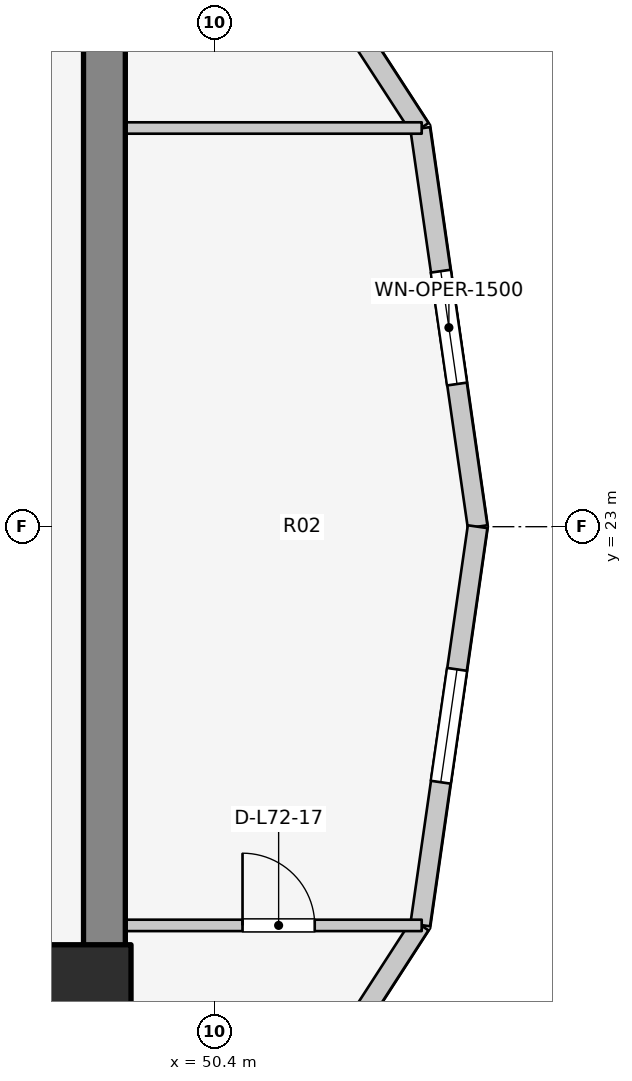
"""IFC4 building model, lengths in metres.
Left out: names, types, materials, properties, quantities, classifications, styles, units other than length and angle.
Written with IfcOpenShell. Run it as: python <this file> out.ifc"""

import sys

from ifc_helpers import new_model, si_unit, direction, frame, frame_2d, origin, origin_2d, place, context, subcontext, project, spatial, rectangle, extrude, element, fill, save


model = new_model("IFC4")
c1 = context("Model", 3, precision=1e-05, world=origin(), true_north=direction((0.0, 1.0)))
c2 = subcontext(c1, "Body", "Model", "MODEL_VIEW")
j1 = project(units=[si_unit("LENGTHUNIT", "METRE"), si_unit("PLANEANGLEUNIT", "RADIAN")], contexts=[c1])
p1 = place(None, origin())
s1 = spatial("IfcSite", under=j1, at=p1, CompositionType="ELEMENT")
p2 = place(p1, origin())
s2 = spatial("IfcBuilding", under=s1, at=p2, CompositionType="ELEMENT")
p3 = place(p2, frame((0.0, 0.0, 235.7)))
s3 = spatial("IfcBuildingStorey", under=s2, at=p3, CompositionType="ELEMENT", Elevation=235.7)
p4 = place(p3, frame((48.95, 17.05, 0.0), z_axis=(0.0, 0.0, 1.0), x_axis=(0.0, 1.0, 0.0)))
e1 = element("IfcWall", 1, at=p4, inside=s3, PredefinedType="SHEAR", context=c2, shape_type="SweptSolid", body=[
    extrude(rectangle(XDim=12.8, YDim=0.55, at=frame_2d((6.4, 0.0))), origin(), (0.0, 0.0, 1.0), 3.1),
])
p5 = place(p3, frame((48.7, 16.9, 0.0), z_axis=(0.0, 0.0, 1.0), x_axis=(1.0, 0.0, 0.0)))
e2 = element("IfcColumn", 2, at=p5, inside=s3, PredefinedType="COLUMN", context=c2, shape_type="SweptSolid", body=[
    extrude(rectangle(XDim=1.2, YDim=1.2, at=origin_2d()), origin(), (0.0, 0.0, 1.0), 3.1),
])
p6 = place(p3, frame((53.86, 23.0, 0.0), z_axis=(0.0, 0.0, 1.0), x_axis=(-0.142712754019, 0.989764148593, 0.0)))
e3 = element("IfcWall", 3, at=p6, inside=s3, PredefinedType="STANDARD", context=c2, shape_type="SweptSolid", body=[
    extrude(rectangle(XDim=5.293, YDim=0.26, at=frame_2d((2.646, 0.0))), origin(), (0.0, 0.0, 1.0), 2.57),
])
p7 = place(p6, frame((1.896, 0.0, 0.75)))
e4 = element("IfcOpeningElement", 4, at=p7, cuts=e3, PredefinedType="OPENING", context=c2, shape_type="SweptSolid", body=[
    extrude(rectangle(XDim=1.5, YDim=1.6, at=frame_2d((0.75, 0.8))), frame((0.0, 0.14, 0.0), z_axis=(0.0, -1.0, 0.0), x_axis=(1.0, 0.0, 0.0)), (0.0, 0.0, 1.0), 0.28),
])
p8 = place(p3, frame((53.105, 28.239, 0.0), z_axis=(0.0, 0.0, 1.0), x_axis=(-0.544475908819, 0.838776480784, 0.0)))
e5 = element("IfcWall", 5, at=p8, inside=s3, PredefinedType="STANDARD", context=c2, shape_type="SweptSolid", body=[
    extrude(rectangle(XDim=4.305, YDim=0.26, at=frame_2d((2.152, 0.0))), origin(), (0.0, 0.0, 1.0), 1.22),
])
p9 = place(p8, frame((1.552, 0.0, 0.15)))
e6 = element("IfcOpeningElement", 6, at=p9, cuts=e5, PredefinedType="OPENING", context=c2, shape_type="SweptSolid", body=[
    extrude(rectangle(XDim=1.2, YDim=0.9, at=frame_2d((0.6, 0.45))), frame((0.0, 0.14, 0.0), z_axis=(0.0, -1.0, 0.0), x_axis=(1.0, 0.0, 0.0)), (0.0, 0.0, 1.0), 0.28),
])
p10 = place(p3, frame((50.761, 14.133, 0.0), z_axis=(0.0, 0.0, 1.0), x_axis=(0.542641766008, 0.839964233634, 0.0)))
e7 = element("IfcWall", 7, at=p10, inside=s3, PredefinedType="STANDARD", context=c2, shape_type="SweptSolid", body=[
    extrude(rectangle(XDim=4.319, YDim=0.26, at=frame_2d((2.16, 0.0))), origin(), (0.0, 0.0, 1.0), 1.22),
])
p11 = place(p10, frame((1.56, 0.0, 0.15)))
e8 = element("IfcOpeningElement", 8, at=p11, cuts=e7, PredefinedType="OPENING", context=c2, shape_type="SweptSolid", body=[
    extrude(rectangle(XDim=1.2, YDim=0.9, at=frame_2d((0.6, 0.45))), frame((0.0, 0.14, 0.0), z_axis=(0.0, -1.0, 0.0), x_axis=(1.0, 0.0, 0.0)), (0.0, 0.0, 1.0), 0.28),
])
p12 = place(p3, frame((53.105, 17.761, 0.0), z_axis=(0.0, 0.0, 1.0), x_axis=(0.142712754019, 0.989764148593, 0.0)))
e9 = element("IfcWall", 9, at=p12, inside=s3, PredefinedType="STANDARD", context=c2, shape_type="SweptSolid", body=[
    extrude(rectangle(XDim=5.293, YDim=0.26, at=frame_2d((2.646, 0.0))), origin(), (0.0, 0.0, 1.0), 2.57),
])
p13 = place(p12, frame((1.896, 0.0, 0.75)))
e10 = element("IfcOpeningElement", 10, at=p13, cuts=e9, PredefinedType="OPENING", context=c2, shape_type="SweptSolid", body=[
    extrude(rectangle(XDim=1.5, YDim=1.6, at=frame_2d((0.75, 0.8))), frame((0.0, 0.14, 0.0), z_axis=(0.0, -1.0, 0.0), x_axis=(1.0, 0.0, 0.0)), (0.0, 0.0, 1.0), 0.28),
])
p14 = place(p3, frame((48.95, 17.755, 0.0), z_axis=(0.0, 0.0, 1.0), x_axis=(1.0, 0.0, 0.0)))
e11 = element("IfcWall", 11, at=p14, inside=s3, PredefinedType="PARTITIONING", context=c2, shape_type="SweptSolid", body=[
    extrude(rectangle(XDim=4.175, YDim=0.15, at=frame_2d((2.087, 0.0))), origin(), (0.0, 0.0, 1.0), 2.575),
])
p15 = place(p14, frame((1.817, 0.0, 0.0)))
e12 = element("IfcOpeningElement", 12, at=p15, cuts=e11, PredefinedType="OPENING", context=c2, shape_type="SweptSolid", body=[
    extrude(rectangle(XDim=0.95, YDim=2.1, at=frame_2d((0.475, 1.05))), frame((0.0, 0.085, 0.0), z_axis=(0.0, -1.0, 0.0), x_axis=(1.0, 0.0, 0.0)), (0.0, 0.0, 1.0), 0.17),
])
p16 = place(p3, frame((48.95, 28.245, 0.0), z_axis=(0.0, 0.0, 1.0), x_axis=(1.0, 0.0, 0.0)))
e13 = element("IfcWall", 13, at=p16, inside=s3, PredefinedType="PARTITIONING", context=c2, shape_type="SweptSolid", body=[
    extrude(rectangle(XDim=4.175, YDim=0.15, at=frame_2d((2.087, 0.0))), origin(), (0.0, 0.0, 1.0), 2.575),
])
p17 = place(p7, origin())
e14 = element("IfcWindow", 14, at=p17, inside=s3, PartitioningType="SINGLE_PANEL", PredefinedType="WINDOW", context=c2, shape_type="SweptSolid", body=[
    extrude(rectangle(XDim=1.5, YDim=1.6, at=frame_2d((0.75, 0.8))), frame((0.0, 0.03, 0.0), z_axis=(0.0, -1.0, 0.0), x_axis=(1.0, 0.0, 0.0)), (0.0, 0.0, 1.0), 0.06),
])
fill(e4, e14)
p18 = place(p13, origin())
e15 = element("IfcWindow", 15, at=p18, inside=s3, PartitioningType="SINGLE_PANEL", PredefinedType="WINDOW", context=c2, shape_type="SweptSolid", body=[
    extrude(rectangle(XDim=1.5, YDim=1.6, at=frame_2d((0.75, 0.8))), frame((0.0, 0.03, 0.0), z_axis=(0.0, -1.0, 0.0), x_axis=(1.0, 0.0, 0.0)), (0.0, 0.0, 1.0), 0.06),
])
fill(e10, e15)
p19 = place(p15, origin())
e16 = element("IfcDoor", 16, at=p19, inside=s3, OperationType="SINGLE_SWING_LEFT", PredefinedType="DOOR", context=c2, shape_type="SweptSolid", body=[
    extrude(rectangle(XDim=0.95, YDim=2.1, at=frame_2d((0.475, 1.05))), frame((0.0, 0.025, 0.0), z_axis=(0.0, -1.0, 0.0), x_axis=(1.0, 0.0, 0.0)), (0.0, 0.0, 1.0), 0.05),
])
fill(e12, e16)
save(model, sys.argv[1])
